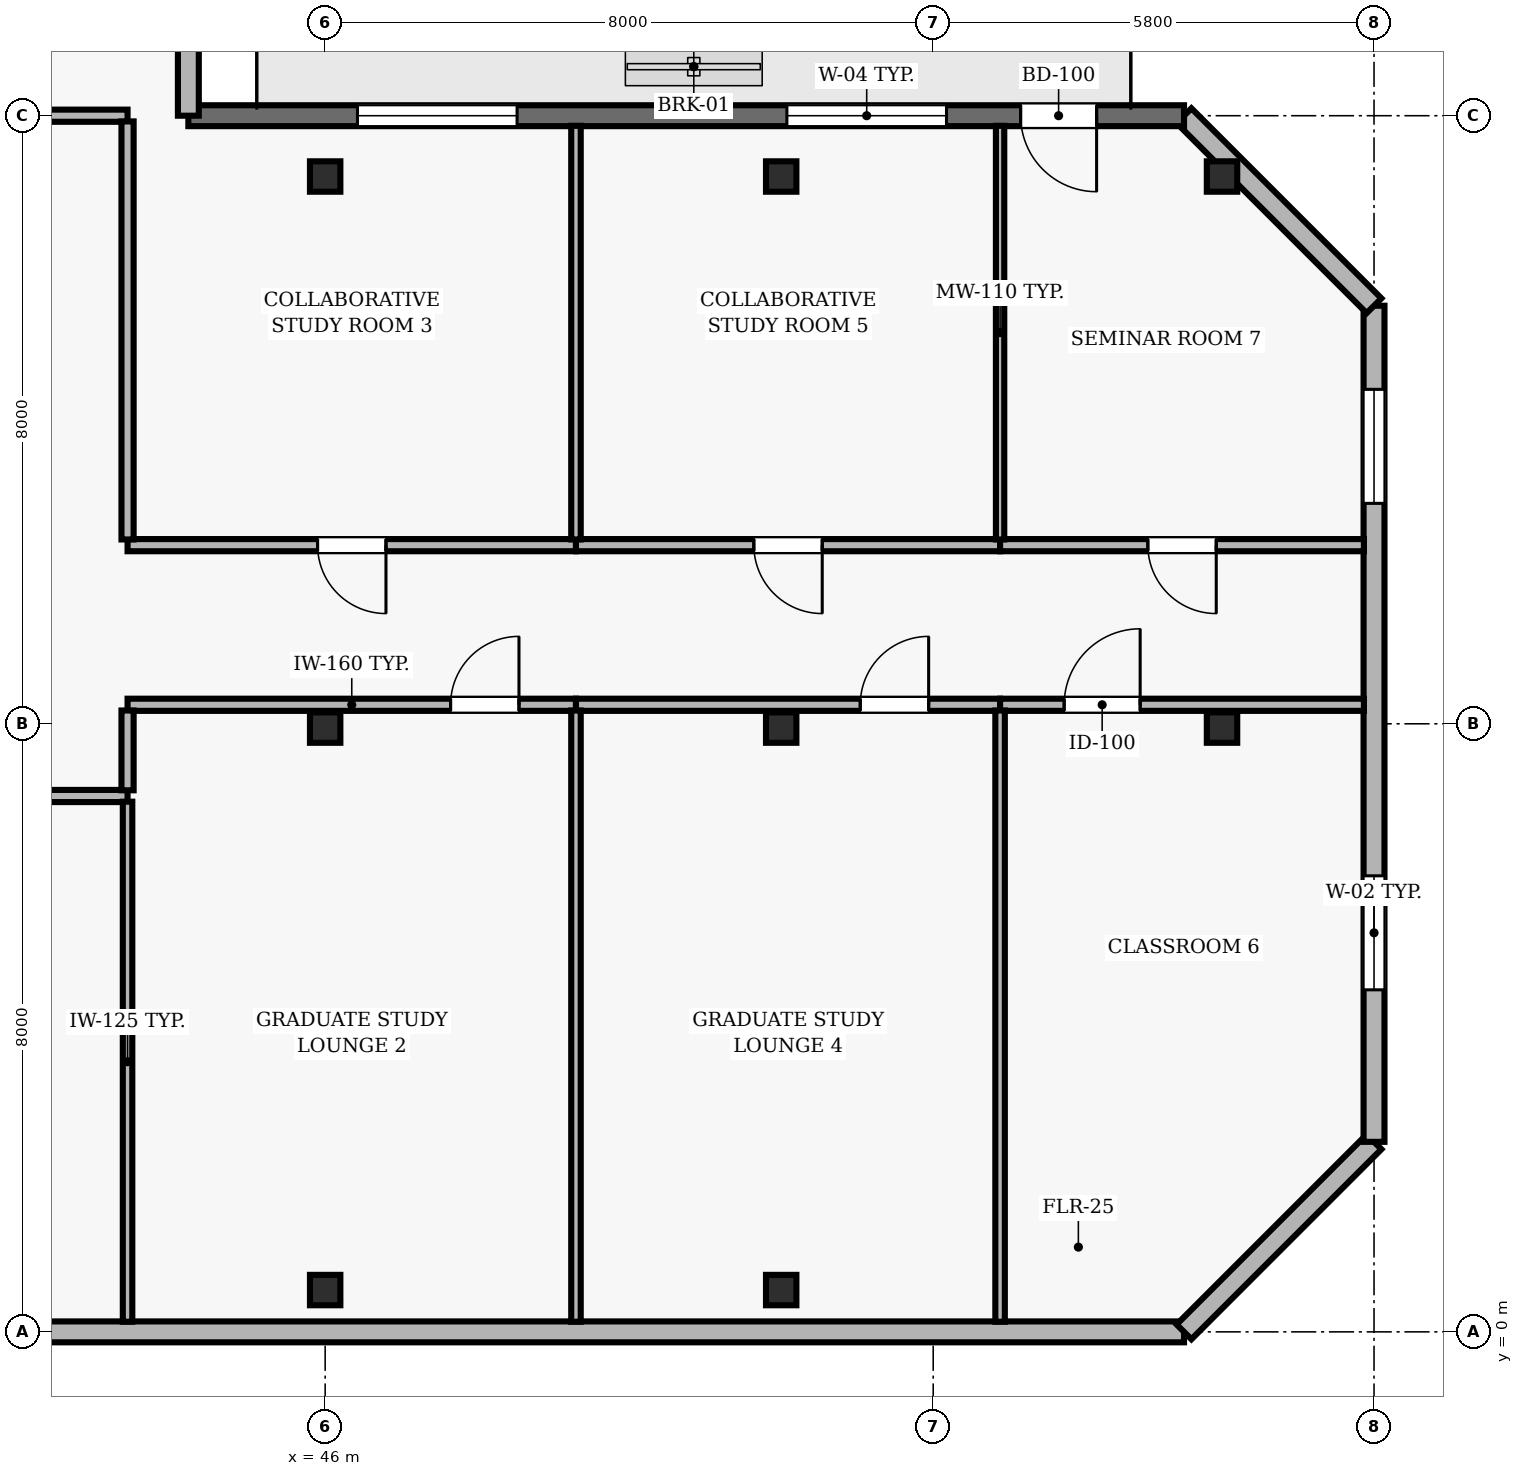
"""IFC4 building model, lengths in metres.
Left out: names, types, materials, properties, quantities, classifications, styles, units other than length and angle.
Written with IfcOpenShell. Run it as: python <this file> out.ifc"""

import sys

from ifc_helpers import new_model, si_unit, direction, frame, frame_2d, origin, origin_2d, place, context, subcontext, project, spatial, rectangle, hollow_rectangle, extrude, element, fill, save


model = new_model("IFC4")
c1 = context("Model", 3, precision=1e-05, world=origin(), true_north=direction((0.0, 1.0)))
c2 = subcontext(c1, "Body", "Model", "MODEL_VIEW")
j1 = project(units=[si_unit("LENGTHUNIT", "METRE"), si_unit("PLANEANGLEUNIT", "RADIAN")], contexts=[c1])
p1 = place(None, origin())
s1 = spatial("IfcSite", under=j1, at=p1, CompositionType="ELEMENT")
p2 = place(p1, origin())
s2 = spatial("IfcBuilding", under=s1, at=p2, CompositionType="ELEMENT")
p3 = place(p2, frame((0.0, 0.0, 291.1)))
s3 = spatial("IfcBuildingStorey", under=s2, at=p3, CompositionType="ELEMENT", Elevation=291.1)
for number, where, z_axis, x_axis in (
    (1, (46.0, 0.55, 0.0), (0.0, 0.0, 1.0), (1.0, 0.0, 0.0)),
    (2, (46.0, 7.95, 0.0), (0.0, 0.0, 1.0), (1.0, 0.0, 0.0)),
    (3, (46.0, 15.2, 0.0), (0.0, 0.0, 1.0), (1.0, 0.0, 0.0)),
    (4, (52.0, 0.55, 0.0), (0.0, 0.0, 1.0), (1.0, 0.0, 0.0)),
    (5, (52.0, 7.95, 0.0), (0.0, 0.0, 1.0), (1.0, 0.0, 0.0)),
    (6, (52.0, 15.2, 0.0), (0.0, 0.0, 1.0), (1.0, 0.0, 0.0)),
    (7, (57.8, 7.95, 0.0), (0.0, 0.0, 1.0), (1.0, 0.0, 0.0)),
    (8, (57.8, 15.2, 0.0), (0.0, 0.0, 1.0), (1.0, 0.0, 0.0)),
):
    element("IfcColumn", number, at=place(p3, frame(where, z_axis=z_axis, x_axis=x_axis)), inside=s3, PredefinedType="COLUMN", context=c2, shape_type="SweptSolid", body=[
        extrude(hollow_rectangle(XDim=0.4, YDim=0.4, WallThickness=0.02, at=origin_2d()), origin(), (0.0, 0.0, 1.0), 3.9),
    ])
p4 = place(p3, frame((24.5, 0.0, 0.0), z_axis=(0.0, 0.0, 1.0), x_axis=(1.0, 0.0, 0.0)))
e9 = element("IfcWall", 9, at=p4, inside=s3, PredefinedType="SOLIDWALL", context=c2, shape_type="SweptSolid", body=[
    extrude(rectangle(XDim=32.8, YDim=0.275, at=frame_2d((16.4, 0.0))), origin(), (0.0, 0.0, 1.0), 3.69),
])
p5 = place(p4, frame((1.233, 0.0, 0.9)))
e10 = element("IfcOpeningElement", 10, at=p5, cuts=e9, PredefinedType="OPENING", context=c2, shape_type="SweptSolid", body=[
    extrude(rectangle(XDim=3.0, YDim=2.2, at=frame_2d((1.5, 1.1))), frame((0.0, 0.147, 0.0), z_axis=(0.0, -1.0, 0.0), x_axis=(1.0, 0.0, 0.0)), (0.0, 0.0, 1.0), 0.295),
])
p6 = place(p3, frame((57.3, 0.0, 0.0), z_axis=(0.0, 0.0, 1.0), x_axis=(0.707106781187, 0.707106781187, 0.0)))
e11 = element("IfcWall", 11, at=p6, inside=s3, PredefinedType="SOLIDWALL", context=c2, shape_type="SweptSolid", body=[
    extrude(rectangle(XDim=3.536, YDim=0.275, at=frame_2d((1.768, 0.0))), origin(), (0.0, 0.0, 1.0), 3.69),
])
p7 = place(p3, frame((59.8, 2.5, 0.0), z_axis=(0.0, 0.0, 1.0), x_axis=(0.0, 1.0, 0.0)))
e12 = element("IfcWall", 12, at=p7, inside=s3, PredefinedType="SOLIDWALL", context=c2, shape_type="SweptSolid", body=[
    extrude(rectangle(XDim=11.0, YDim=0.275, at=frame_2d((5.5, 0.0))), origin(), (0.0, 0.0, 1.0), 3.69),
])
p8 = place(p7, frame((2.0, 0.0, 0.9)))
e13 = element("IfcOpeningElement", 13, at=p8, cuts=e12, PredefinedType="OPENING", context=c2, shape_type="SweptSolid", body=[
    extrude(rectangle(XDim=1.5, YDim=1.6, at=frame_2d((0.75, 0.8))), frame((0.0, 0.147, 0.0), z_axis=(0.0, -1.0, 0.0), x_axis=(1.0, 0.0, 0.0)), (0.0, 0.0, 1.0), 0.295),
])
p9 = place(p7, frame((8.4, 0.0, 0.9)))
e14 = element("IfcOpeningElement", 14, at=p9, cuts=e12, PredefinedType="OPENING", context=c2, shape_type="SweptSolid", body=[
    extrude(rectangle(XDim=1.5, YDim=1.6, at=frame_2d((0.75, 0.8))), frame((0.0, 0.147, 0.0), z_axis=(0.0, -1.0, 0.0), x_axis=(1.0, 0.0, 0.0)), (0.0, 0.0, 1.0), 0.295),
])
p10 = place(p3, frame((59.8, 13.5, 0.0), z_axis=(0.0, 0.0, 1.0), x_axis=(-0.707106781187, 0.707106781187, 0.0)))
e15 = element("IfcWall", 15, at=p10, inside=s3, PredefinedType="SOLIDWALL", context=c2, shape_type="SweptSolid", body=[
    extrude(rectangle(XDim=3.536, YDim=0.275, at=frame_2d((1.768, 0.0))), origin(), (0.0, 0.0, 1.0), 3.69),
])
p11 = place(p3, frame((57.3, 16.0, 0.0), z_axis=(0.0, 0.0, 1.0), x_axis=(-1.0, 0.0, 0.0)))
e16 = element("IfcWall", 16, at=p11, inside=s3, PredefinedType="SOLIDWALL", context=c2, shape_type="SweptSolid", body=[
    extrude(rectangle(XDim=13.1, YDim=0.275, at=frame_2d((6.55, 0.0))), origin(), (0.0, 0.0, 1.0), 3.69),
])
p12 = place(p11, frame((1.15, 0.0, 0.0)))
e17 = element("IfcOpeningElement", 17, at=p12, cuts=e16, PredefinedType="OPENING", context=c2, shape_type="SweptSolid", body=[
    extrude(rectangle(XDim=1.0, YDim=2.2, at=frame_2d((0.5, 1.1))), frame((0.0, 0.147, 0.0), z_axis=(0.0, -1.0, 0.0), x_axis=(1.0, 0.0, 0.0)), (0.0, 0.0, 1.0), 0.295),
])
p13 = place(p11, frame((3.125, 0.0, 0.9)))
e18 = element("IfcOpeningElement", 18, at=p13, cuts=e16, PredefinedType="OPENING", context=c2, shape_type="SweptSolid", body=[
    extrude(rectangle(XDim=2.1, YDim=1.6, at=frame_2d((1.05, 0.8))), frame((0.0, 0.147, 0.0), z_axis=(0.0, -1.0, 0.0), x_axis=(1.0, 0.0, 0.0)), (0.0, 0.0, 1.0), 0.295),
])
p14 = place(p11, frame((8.775, 0.0, 0.9)))
e19 = element("IfcOpeningElement", 19, at=p14, cuts=e16, PredefinedType="OPENING", context=c2, shape_type="SweptSolid", body=[
    extrude(rectangle(XDim=2.1, YDim=1.6, at=frame_2d((1.05, 0.8))), frame((0.0, 0.147, 0.0), z_axis=(0.0, -1.0, 0.0), x_axis=(1.0, 0.0, 0.0)), (0.0, 0.0, 1.0), 0.295),
])
p15 = place(p3, frame((44.2, 16.0, 0.0), z_axis=(0.0, 0.0, 1.0), x_axis=(0.0, 1.0, 0.0)))
e20 = element("IfcWall", 20, at=p15, inside=s3, PredefinedType="SOLIDWALL", context=c2, shape_type="SweptSolid", body=[
    extrude(rectangle(XDim=4.4, YDim=0.275, at=frame_2d((2.2, 0.0))), origin(), (0.0, 0.0, 1.0), 3.69),
])
p16 = place(p3, frame((38.05, 7.05, 0.0), z_axis=(0.0, 0.0, 1.0), x_axis=(1.0, 0.0, 0.0)))
e21 = element("IfcWall", 21, at=p16, inside=s3, PredefinedType="PARTITIONING", context=c2, shape_type="SweptSolid", body=[
    extrude(rectangle(XDim=5.35, YDim=0.16, at=frame_2d((2.675, 0.0))), origin(), (0.0, 0.0, 1.0), 3.69),
])
p17 = place(p16, frame((2.225, 0.0, 0.0)))
e22 = element("IfcOpeningElement", 22, at=p17, cuts=e21, PredefinedType="OPENING", context=c2, shape_type="SweptSolid", body=[
    extrude(rectangle(XDim=0.9, YDim=2.1, at=frame_2d((0.45, 1.05))), frame((0.0, 0.09, 0.0), z_axis=(0.0, -1.0, 0.0), x_axis=(1.0, 0.0, 0.0)), (0.0, 0.0, 1.0), 0.18),
])
p18 = place(p3, frame((43.4, 8.25, 0.0), z_axis=(0.0, 0.0, 1.0), x_axis=(1.0, 0.0, 0.0)))
e23 = element("IfcWall", 23, at=p18, inside=s3, PredefinedType="PARTITIONING", context=c2, shape_type="SweptSolid", body=[
    extrude(rectangle(XDim=5.9, YDim=0.16, at=frame_2d((2.95, 0.0))), origin(), (0.0, 0.0, 1.0), 3.227),
])
p19 = place(p18, frame((4.25, 0.0, 0.0)))
e24 = element("IfcOpeningElement", 24, at=p19, cuts=e23, PredefinedType="OPENING", context=c2, shape_type="SweptSolid", body=[
    extrude(rectangle(XDim=0.9, YDim=2.1, at=frame_2d((0.45, 1.05))), frame((0.0, 0.09, 0.0), z_axis=(0.0, -1.0, 0.0), x_axis=(1.0, 0.0, 0.0)), (0.0, 0.0, 1.0), 0.18),
])
p20 = place(p3, frame((43.4, 16.0, 0.0), z_axis=(0.0, 0.0, 1.0), x_axis=(-1.0, 0.0, 0.0)))
e25 = element("IfcWall", 25, at=p20, inside=s3, PredefinedType="PARTITIONING", context=c2, shape_type="SweptSolid", body=[
    extrude(rectangle(XDim=5.35, YDim=0.16, at=frame_2d((2.675, 0.0))), origin(), (0.0, 0.0, 1.0), 3.39),
])
p21 = place(p20, frame((2.225, 0.0, 0.0)))
e26 = element("IfcOpeningElement", 26, at=p21, cuts=e25, PredefinedType="OPENING", context=c2, shape_type="SweptSolid", body=[
    extrude(rectangle(XDim=0.9, YDim=2.1, at=frame_2d((0.45, 1.05))), frame((0.0, 0.09, 0.0), z_axis=(0.0, -1.0, 0.0), x_axis=(1.0, 0.0, 0.0)), (0.0, 0.0, 1.0), 0.18),
])
p22 = place(p3, frame((49.3, 8.25, 0.0), z_axis=(0.0, 0.0, 1.0), x_axis=(1.0, 0.0, 0.0)))
e27 = element("IfcWall", 27, at=p22, inside=s3, PredefinedType="PARTITIONING", context=c2, shape_type="SweptSolid", body=[
    extrude(rectangle(XDim=5.58, YDim=0.16, at=frame_2d((2.79, 0.0))), origin(), (0.0, 0.0, 1.0), 3.227),
])
p23 = place(p22, frame((3.74, 0.0, 0.0)))
e28 = element("IfcOpeningElement", 28, at=p23, cuts=e27, PredefinedType="OPENING", context=c2, shape_type="SweptSolid", body=[
    extrude(rectangle(XDim=0.9, YDim=2.1, at=frame_2d((0.45, 1.05))), frame((0.0, 0.09, 0.0), z_axis=(0.0, -1.0, 0.0), x_axis=(1.0, 0.0, 0.0)), (0.0, 0.0, 1.0), 0.18),
])
p24 = place(p3, frame((49.3, 10.35, 0.0), z_axis=(0.0, 0.0, 1.0), x_axis=(-1.0, 0.0, 0.0)))
e29 = element("IfcWall", 29, at=p24, inside=s3, PredefinedType="PARTITIONING", context=c2, shape_type="SweptSolid", body=[
    extrude(rectangle(XDim=5.9, YDim=0.16, at=frame_2d((2.95, 0.0))), origin(), (0.0, 0.0, 1.0), 3.424),
])
p25 = place(p24, frame((2.5, 0.0, 0.0)))
e30 = element("IfcOpeningElement", 30, at=p25, cuts=e29, PredefinedType="OPENING", context=c2, shape_type="SweptSolid", body=[
    extrude(rectangle(XDim=0.9, YDim=2.1, at=frame_2d((0.45, 1.05))), frame((0.0, 0.09, 0.0), z_axis=(0.0, -1.0, 0.0), x_axis=(1.0, 0.0, 0.0)), (0.0, 0.0, 1.0), 0.18),
])
p26 = place(p3, frame((54.88, 8.25, 0.0), z_axis=(0.0, 0.0, 1.0), x_axis=(1.0, 0.0, 0.0)))
e31 = element("IfcWall", 31, at=p26, inside=s3, PredefinedType="PARTITIONING", context=c2, shape_type="SweptSolid", body=[
    extrude(rectangle(XDim=4.787, YDim=0.16, at=frame_2d((2.394, 0.0))), origin(), (0.0, 0.0, 1.0), 3.227),
])
p27 = place(p26, frame((0.843, 0.0, 0.0)))
e32 = element("IfcOpeningElement", 32, at=p27, cuts=e31, PredefinedType="OPENING", context=c2, shape_type="SweptSolid", body=[
    extrude(rectangle(XDim=1.0, YDim=2.1, at=frame_2d((0.5, 1.05))), frame((0.0, 0.09, 0.0), z_axis=(0.0, -1.0, 0.0), x_axis=(1.0, 0.0, 0.0)), (0.0, 0.0, 1.0), 0.18),
])
p28 = place(p3, frame((54.88, 10.35, 0.0), z_axis=(0.0, 0.0, 1.0), x_axis=(-1.0, 0.0, 0.0)))
e33 = element("IfcWall", 33, at=p28, inside=s3, PredefinedType="PARTITIONING", context=c2, shape_type="SweptSolid", body=[
    extrude(rectangle(XDim=5.58, YDim=0.16, at=frame_2d((2.79, 0.0))), origin(), (0.0, 0.0, 1.0), 3.424),
])
p29 = place(p28, frame((2.34, 0.0, 0.0)))
e34 = element("IfcOpeningElement", 34, at=p29, cuts=e33, PredefinedType="OPENING", context=c2, shape_type="SweptSolid", body=[
    extrude(rectangle(XDim=0.9, YDim=2.1, at=frame_2d((0.45, 1.05))), frame((0.0, 0.09, 0.0), z_axis=(0.0, -1.0, 0.0), x_axis=(1.0, 0.0, 0.0)), (0.0, 0.0, 1.0), 0.18),
])
p30 = place(p3, frame((59.667, 10.35, 0.0), z_axis=(0.0, 0.0, 1.0), x_axis=(-1.0, 0.0, 0.0)))
e35 = element("IfcWall", 35, at=p30, inside=s3, PredefinedType="PARTITIONING", context=c2, shape_type="SweptSolid", body=[
    extrude(rectangle(XDim=4.787, YDim=0.16, at=frame_2d((2.394, 0.0))), origin(), (0.0, 0.0, 1.0), 3.424),
])
p31 = place(p30, frame((1.943, 0.0, 0.0)))
e36 = element("IfcOpeningElement", 36, at=p31, cuts=e35, PredefinedType="OPENING", context=c2, shape_type="SweptSolid", body=[
    extrude(rectangle(XDim=0.9, YDim=2.1, at=frame_2d((0.45, 1.05))), frame((0.0, 0.09, 0.0), z_axis=(0.0, -1.0, 0.0), x_axis=(1.0, 0.0, 0.0)), (0.0, 0.0, 1.0), 0.18),
])
p32 = place(p3, frame((43.4, 0.133, 0.0), z_axis=(0.0, 0.0, 1.0), x_axis=(0.0, 1.0, 0.0)))
e37 = element("IfcWall", 37, at=p32, inside=s3, PredefinedType="PARTITIONING", context=c2, shape_type="SweptSolid", body=[
    extrude(rectangle(XDim=6.842, YDim=0.125, at=frame_2d((3.421, 0.0))), origin(), (0.0, 0.0, 1.0), 3.69),
])
p33 = place(p3, frame((43.4, 7.125, 0.0), z_axis=(0.0, 0.0, 1.0), x_axis=(0.0, 1.0, 0.0)))
e38 = element("IfcWall", 38, at=p33, inside=s3, PredefinedType="PARTITIONING", context=c2, shape_type="SweptSolid", body=[
    extrude(rectangle(XDim=1.05, YDim=0.16, at=frame_2d((0.525, 0.0))), origin(), (0.0, 0.0, 1.0), 3.69),
])
p34 = place(p3, frame((43.4, 10.425, 0.0), z_axis=(0.0, 0.0, 1.0), x_axis=(0.0, 1.0, 0.0)))
e39 = element("IfcWall", 39, at=p34, inside=s3, PredefinedType="PARTITIONING", context=c2, shape_type="SweptSolid", body=[
    extrude(rectangle(XDim=5.5, YDim=0.16, at=frame_2d((2.75, 0.0))), origin(), (0.0, 0.0, 1.0), 3.69),
])
p35 = place(p3, frame((49.3, 0.133, 0.0), z_axis=(0.0, 0.0, 1.0), x_axis=(0.0, 1.0, 0.0)))
e40 = element("IfcWall", 40, at=p35, inside=s3, PredefinedType="PARTITIONING", context=c2, shape_type="SweptSolid", body=[
    extrude(rectangle(XDim=8.042, YDim=0.125, at=frame_2d((4.021, 0.0))), origin(), (0.0, 0.0, 1.0), 3.69),
])
p36 = place(p3, frame((49.3, 10.425, 0.0), z_axis=(0.0, 0.0, 1.0), x_axis=(0.0, 1.0, 0.0)))
e41 = element("IfcWall", 41, at=p36, inside=s3, PredefinedType="PARTITIONING", context=c2, shape_type="SweptSolid", body=[
    extrude(rectangle(XDim=5.442, YDim=0.125, at=frame_2d((2.721, 0.0))), origin(), (0.0, 0.0, 1.0), 3.69),
])
p37 = place(p3, frame((54.88, 0.133, 0.0), z_axis=(0.0, 0.0, 1.0), x_axis=(0.0, 1.0, 0.0)))
e42 = element("IfcWall", 42, at=p37, inside=s3, PredefinedType="PARTITIONING", context=c2, shape_type="SweptSolid", body=[
    extrude(rectangle(XDim=8.042, YDim=0.125, at=frame_2d((4.021, 0.0))), origin(), (0.0, 0.0, 1.0), 3.69),
])
p38 = place(p3, frame((54.88, 10.425, 0.0), z_axis=(0.0, 0.0, 1.0), x_axis=(0.0, 1.0, 0.0)))
e43 = element("IfcWall", 43, at=p38, inside=s3, PredefinedType="MOVABLE", context=c2, shape_type="SweptSolid", body=[
    extrude(rectangle(XDim=5.442, YDim=0.11, at=frame_2d((2.721, 0.0))), origin(), (0.0, 0.0, 1.0), 3.69),
])
p39 = place(p8, origin())
e44 = element("IfcWindow", 44, at=p39, inside=s3, PartitioningType="SINGLE_PANEL", PredefinedType="WINDOW", context=c2, shape_type="SweptSolid", body=[
    extrude(rectangle(XDim=1.5, YDim=1.6, at=frame_2d((0.75, 0.8))), frame((0.0, 0.03, 0.0), z_axis=(0.0, -1.0, 0.0), x_axis=(1.0, 0.0, 0.0)), (0.0, 0.0, 1.0), 0.06),
])
fill(e13, e44)
p40 = place(p9, origin())
e45 = element("IfcWindow", 45, at=p40, inside=s3, PartitioningType="SINGLE_PANEL", PredefinedType="WINDOW", context=c2, shape_type="SweptSolid", body=[
    extrude(rectangle(XDim=1.5, YDim=1.6, at=frame_2d((0.75, 0.8))), frame((0.0, 0.03, 0.0), z_axis=(0.0, -1.0, 0.0), x_axis=(1.0, 0.0, 0.0)), (0.0, 0.0, 1.0), 0.06),
])
fill(e14, e45)
p41 = place(p12, origin())
e46 = element("IfcDoor", 46, at=p41, inside=s3, OperationType="SINGLE_SWING_LEFT", PredefinedType="DOOR", context=c2, shape_type="SweptSolid", body=[
    extrude(rectangle(XDim=1.0, YDim=2.2, at=frame_2d((0.5, 1.1))), frame((0.0, 0.025, 0.0), z_axis=(0.0, -1.0, 0.0), x_axis=(1.0, 0.0, 0.0)), (0.0, 0.0, 1.0), 0.05),
])
fill(e17, e46)
p42 = place(p13, origin())
e47 = element("IfcWindow", 47, at=p42, inside=s3, PartitioningType="SINGLE_PANEL", PredefinedType="WINDOW", context=c2, shape_type="SweptSolid", body=[
    extrude(rectangle(XDim=2.1, YDim=1.6, at=frame_2d((1.05, 0.8))), frame((0.0, 0.03, 0.0), z_axis=(0.0, -1.0, 0.0), x_axis=(1.0, 0.0, 0.0)), (0.0, 0.0, 1.0), 0.06),
])
fill(e18, e47)
p43 = place(p14, origin())
e48 = element("IfcWindow", 48, at=p43, inside=s3, PartitioningType="SINGLE_PANEL", PredefinedType="WINDOW", context=c2, shape_type="SweptSolid", body=[
    extrude(rectangle(XDim=2.1, YDim=1.6, at=frame_2d((1.05, 0.8))), frame((0.0, 0.03, 0.0), z_axis=(0.0, -1.0, 0.0), x_axis=(1.0, 0.0, 0.0)), (0.0, 0.0, 1.0), 0.06),
])
fill(e19, e48)
p44 = place(p19, origin())
e49 = element("IfcDoor", 49, at=p44, inside=s3, OperationType="SINGLE_SWING_RIGHT", PredefinedType="DOOR", context=c2, shape_type="SweptSolid", body=[
    extrude(rectangle(XDim=0.9, YDim=2.1, at=frame_2d((0.45, 1.05))), frame((0.0, 0.025, 0.0), z_axis=(0.0, -1.0, 0.0), x_axis=(1.0, 0.0, 0.0)), (0.0, 0.0, 1.0), 0.05),
])
fill(e24, e49)
p45 = place(p25, origin())
e50 = element("IfcDoor", 50, at=p45, inside=s3, OperationType="SINGLE_SWING_LEFT", PredefinedType="DOOR", context=c2, shape_type="SweptSolid", body=[
    extrude(rectangle(XDim=0.9, YDim=2.1, at=frame_2d((0.45, 1.05))), frame((0.0, 0.025, 0.0), z_axis=(0.0, -1.0, 0.0), x_axis=(1.0, 0.0, 0.0)), (0.0, 0.0, 1.0), 0.05),
])
fill(e30, e50)
p46 = place(p23, origin())
e51 = element("IfcDoor", 51, at=p46, inside=s3, OperationType="SINGLE_SWING_RIGHT", PredefinedType="DOOR", context=c2, shape_type="SweptSolid", body=[
    extrude(rectangle(XDim=0.9, YDim=2.1, at=frame_2d((0.45, 1.05))), frame((0.0, 0.025, 0.0), z_axis=(0.0, -1.0, 0.0), x_axis=(1.0, 0.0, 0.0)), (0.0, 0.0, 1.0), 0.05),
])
fill(e28, e51)
p47 = place(p29, origin())
e52 = element("IfcDoor", 52, at=p47, inside=s3, OperationType="SINGLE_SWING_LEFT", PredefinedType="DOOR", context=c2, shape_type="SweptSolid", body=[
    extrude(rectangle(XDim=0.9, YDim=2.1, at=frame_2d((0.45, 1.05))), frame((0.0, 0.025, 0.0), z_axis=(0.0, -1.0, 0.0), x_axis=(1.0, 0.0, 0.0)), (0.0, 0.0, 1.0), 0.05),
])
fill(e34, e52)
p48 = place(p27, origin())
e53 = element("IfcDoor", 53, at=p48, inside=s3, OperationType="SINGLE_SWING_RIGHT", PredefinedType="DOOR", context=c2, shape_type="SweptSolid", body=[
    extrude(rectangle(XDim=1.0, YDim=2.1, at=frame_2d((0.5, 1.05))), frame((0.0, 0.025, 0.0), z_axis=(0.0, -1.0, 0.0), x_axis=(1.0, 0.0, 0.0)), (0.0, 0.0, 1.0), 0.05),
])
fill(e32, e53)
p49 = place(p31, origin())
e54 = element("IfcDoor", 54, at=p49, inside=s3, OperationType="SINGLE_SWING_LEFT", PredefinedType="DOOR", context=c2, shape_type="SweptSolid", body=[
    extrude(rectangle(XDim=0.9, YDim=2.1, at=frame_2d((0.45, 1.05))), frame((0.0, 0.025, 0.0), z_axis=(0.0, -1.0, 0.0), x_axis=(1.0, 0.0, 0.0)), (0.0, 0.0, 1.0), 0.05),
])
fill(e36, e54)
save(model, sys.argv[1])
